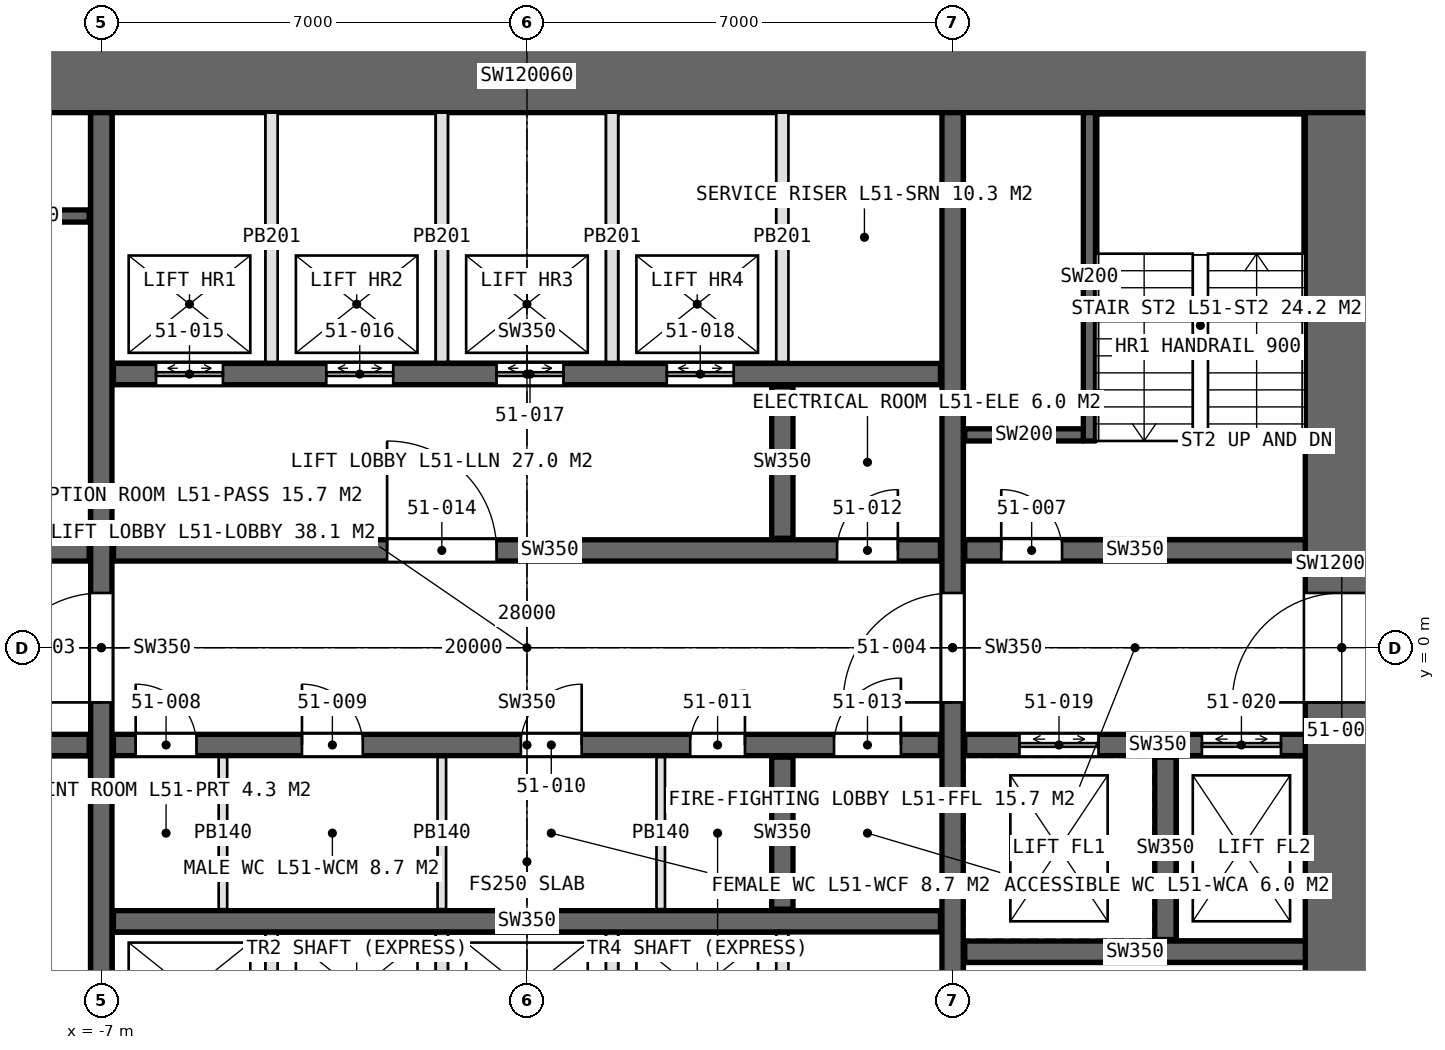
"""IFC4 building model, lengths in metres.
Left out: names, types, materials, properties, quantities, classifications, styles, units other than length and angle.
Written with IfcOpenShell. Run it as: python <this file> out.ifc"""

import sys

from ifc_helpers import new_model, si_unit, direction, frame, frame_2d, origin, place, context, subcontext, project, spatial, rectangle, extrude, element, fill, save


model = new_model("IFC4")
c1 = context("Model", 3, precision=1e-05, world=origin(), true_north=direction((0.0, 1.0)))
c2 = subcontext(c1, "Body", "Model", "MODEL_VIEW")
j1 = project(units=[si_unit("LENGTHUNIT", "METRE"), si_unit("PLANEANGLEUNIT", "RADIAN")], contexts=[c1])
p1 = place(None, origin())
s1 = spatial("IfcSite", under=j1, at=p1, CompositionType="ELEMENT")
p2 = place(p1, origin())
s2 = spatial("IfcBuilding", under=s1, at=p2, CompositionType="ELEMENT")
p3 = place(p2, frame((0.0, 0.0, 232.6)))
s3 = spatial("IfcBuildingStorey", under=s2, at=p3, CompositionType="ELEMENT", Elevation=232.6)
p4 = place(p3, frame((14.0, 9.4, 0.0), z_axis=(0.0, 0.0, 1.0), x_axis=(-1.0, 0.0, 0.0)))
e1 = element("IfcWall", 1, at=p4, inside=s3, PredefinedType="SHEAR", context=c2, shape_type="SweptSolid", body=[
    extrude(rectangle(XDim=28.0, YDim=1.2, at=frame_2d((14.0, 0.0))), origin(), (0.0, 0.0, 1.0), 4.2),
])
p5 = place(p4, frame((24.0, 0.0, 0.0)))
e2 = element("IfcOpeningElement", 2, at=p5, cuts=e1, PredefinedType="OPENING", context=c2, shape_type="SweptSolid", body=[
    extrude(rectangle(XDim=1.0, YDim=2.4, at=frame_2d((0.5, 1.2))), frame((0.0, 0.61, 0.0), z_axis=(0.0, -1.0, 0.0), x_axis=(1.0, 0.0, 0.0)), (0.0, 0.0, 1.0), 1.22),
])
p6 = place(p3, frame((13.4, -8.8, 0.0), z_axis=(0.0, 0.0, 1.0), x_axis=(0.0, 1.0, 0.0)))
e3 = element("IfcWall", 3, at=p6, inside=s3, PredefinedType="SHEAR", context=c2, shape_type="SweptSolid", body=[
    extrude(rectangle(XDim=17.6, YDim=1.2, at=frame_2d((8.8, 0.0))), origin(), (0.0, 0.0, 1.0), 4.2),
])
p7 = place(p6, frame((7.9, 0.0, 0.0)))
e4 = element("IfcOpeningElement", 4, at=p7, cuts=e3, PredefinedType="OPENING", context=c2, shape_type="SweptSolid", body=[
    extrude(rectangle(XDim=1.8, YDim=2.4, at=frame_2d((0.9, 1.2))), frame((0.0, 0.61, 0.0), z_axis=(0.0, -1.0, 0.0), x_axis=(1.0, 0.0, 0.0)), (0.0, 0.0, 1.0), 1.22),
])
p8 = place(p3, frame((-7.0, -8.8, 0.0), z_axis=(0.0, 0.0, 1.0), x_axis=(0.0, 1.0, 0.0)))
e5 = element("IfcWall", 5, at=p8, inside=s3, PredefinedType="SHEAR", context=c2, shape_type="SweptSolid", body=[
    extrude(rectangle(XDim=17.6, YDim=0.35, at=frame_2d((8.8, 0.0))), origin(), (0.0, 0.0, 1.0), 4.2),
])
p9 = place(p8, frame((7.9, 0.0, 0.0)))
e6 = element("IfcOpeningElement", 6, at=p9, cuts=e5, PredefinedType="OPENING", context=c2, shape_type="SweptSolid", body=[
    extrude(rectangle(XDim=1.8, YDim=2.4, at=frame_2d((0.9, 1.2))), frame((0.0, 0.185, 0.0), z_axis=(0.0, -1.0, 0.0), x_axis=(1.0, 0.0, 0.0)), (0.0, 0.0, 1.0), 0.37),
])
p10 = place(p3, frame((7.0, -8.8, 0.0), z_axis=(0.0, 0.0, 1.0), x_axis=(0.0, 1.0, 0.0)))
e7 = element("IfcWall", 7, at=p10, inside=s3, PredefinedType="SHEAR", context=c2, shape_type="SweptSolid", body=[
    extrude(rectangle(XDim=17.6, YDim=0.35, at=frame_2d((8.8, 0.0))), origin(), (0.0, 0.0, 1.0), 4.2),
])
p11 = place(p10, frame((7.9, 0.0, 0.0)))
e8 = element("IfcOpeningElement", 8, at=p11, cuts=e7, PredefinedType="OPENING", context=c2, shape_type="SweptSolid", body=[
    extrude(rectangle(XDim=1.8, YDim=2.4, at=frame_2d((0.9, 1.2))), frame((0.0, 0.185, 0.0), z_axis=(0.0, -1.0, 0.0), x_axis=(1.0, 0.0, 0.0)), (0.0, 0.0, 1.0), 0.37),
])
p12 = place(p3, frame((-6.8, 1.6, 0.0), z_axis=(0.0, 0.0, 1.0), x_axis=(1.0, 0.0, 0.0)))
e9 = element("IfcWall", 9, at=p12, inside=s3, PredefinedType="SHEAR", context=c2, shape_type="SweptSolid", body=[
    extrude(rectangle(XDim=13.6, YDim=0.35, at=frame_2d((6.8, 0.0))), origin(), (0.0, 0.0, 1.0), 4.2),
])
p13 = place(p12, frame((11.9, 0.0, 0.0)))
e10 = element("IfcOpeningElement", 10, at=p13, cuts=e9, PredefinedType="OPENING", context=c2, shape_type="SweptSolid", body=[
    extrude(rectangle(XDim=1.0, YDim=2.4, at=frame_2d((0.5, 1.2))), frame((0.0, 0.185, 0.0), z_axis=(0.0, -1.0, 0.0), x_axis=(1.0, 0.0, 0.0)), (0.0, 0.0, 1.0), 0.37),
])
p14 = place(p12, frame((4.5, 0.0, 0.0)))
e11 = element("IfcOpeningElement", 11, at=p14, cuts=e9, PredefinedType="OPENING", context=c2, shape_type="SweptSolid", body=[
    extrude(rectangle(XDim=1.8, YDim=2.4, at=frame_2d((0.9, 1.2))), frame((0.0, 0.185, 0.0), z_axis=(0.0, -1.0, 0.0), x_axis=(1.0, 0.0, 0.0)), (0.0, 0.0, 1.0), 0.37),
])
p15 = place(p3, frame((-6.8, -1.6, 0.0), z_axis=(0.0, 0.0, 1.0), x_axis=(1.0, 0.0, 0.0)))
e12 = element("IfcWall", 12, at=p15, inside=s3, PredefinedType="SHEAR", context=c2, shape_type="SweptSolid", body=[
    extrude(rectangle(XDim=13.6, YDim=0.35, at=frame_2d((6.8, 0.0))), origin(), (0.0, 0.0, 1.0), 4.2),
])
p16 = place(p15, frame((0.365, 0.0, 0.0)))
e13 = element("IfcOpeningElement", 13, at=p16, cuts=e12, PredefinedType="OPENING", context=c2, shape_type="SweptSolid", body=[
    extrude(rectangle(XDim=1.0, YDim=2.4, at=frame_2d((0.5, 1.2))), frame((0.0, 0.185, 0.0), z_axis=(0.0, -1.0, 0.0), x_axis=(1.0, 0.0, 0.0)), (0.0, 0.0, 1.0), 0.37),
])
p17 = place(p15, frame((3.1, 0.0, 0.0)))
e14 = element("IfcOpeningElement", 14, at=p17, cuts=e12, PredefinedType="OPENING", context=c2, shape_type="SweptSolid", body=[
    extrude(rectangle(XDim=1.0, YDim=2.4, at=frame_2d((0.5, 1.2))), frame((0.0, 0.185, 0.0), z_axis=(0.0, -1.0, 0.0), x_axis=(1.0, 0.0, 0.0)), (0.0, 0.0, 1.0), 0.37),
])
p18 = place(p15, frame((6.7, 0.0, 0.0)))
e15 = element("IfcOpeningElement", 15, at=p18, cuts=e12, PredefinedType="OPENING", context=c2, shape_type="SweptSolid", body=[
    extrude(rectangle(XDim=1.0, YDim=2.4, at=frame_2d((0.5, 1.2))), frame((0.0, 0.185, 0.0), z_axis=(0.0, -1.0, 0.0), x_axis=(1.0, 0.0, 0.0)), (0.0, 0.0, 1.0), 0.37),
])
p19 = place(p15, frame((9.485, 0.0, 0.0)))
e16 = element("IfcOpeningElement", 16, at=p19, cuts=e12, PredefinedType="OPENING", context=c2, shape_type="SweptSolid", body=[
    extrude(rectangle(XDim=0.9, YDim=2.4, at=frame_2d((0.45, 1.2))), frame((0.0, 0.185, 0.0), z_axis=(0.0, -1.0, 0.0), x_axis=(1.0, 0.0, 0.0)), (0.0, 0.0, 1.0), 0.37),
])
p20 = place(p15, frame((11.85, 0.0, 0.0)))
e17 = element("IfcOpeningElement", 17, at=p20, cuts=e12, PredefinedType="OPENING", context=c2, shape_type="SweptSolid", body=[
    extrude(rectangle(XDim=1.1, YDim=2.4, at=frame_2d((0.55, 1.2))), frame((0.0, 0.185, 0.0), z_axis=(0.0, -1.0, 0.0), x_axis=(1.0, 0.0, 0.0)), (0.0, 0.0, 1.0), 0.37),
])
p21 = place(p3, frame((-6.8, 4.5, 0.0), z_axis=(0.0, 0.0, 1.0), x_axis=(1.0, 0.0, 0.0)))
e18 = element("IfcWall", 18, at=p21, inside=s3, PredefinedType="SHEAR", context=c2, shape_type="SweptSolid", body=[
    extrude(rectangle(XDim=13.6, YDim=0.35, at=frame_2d((6.8, 0.0))), origin(), (0.0, 0.0, 1.0), 4.2),
])
p22 = place(p21, frame((0.7, 0.0, 0.0)))
e19 = element("IfcOpeningElement", 19, at=p22, cuts=e18, PredefinedType="OPENING", context=c2, shape_type="SweptSolid", body=[
    extrude(rectangle(XDim=1.1, YDim=2.4, at=frame_2d((0.55, 1.2))), frame((0.0, 0.185, 0.0), z_axis=(0.0, -1.0, 0.0), x_axis=(1.0, 0.0, 0.0)), (0.0, 0.0, 1.0), 0.37),
])
p23 = place(p21, frame((3.5, 0.0, 0.0)))
e20 = element("IfcOpeningElement", 20, at=p23, cuts=e18, PredefinedType="OPENING", context=c2, shape_type="SweptSolid", body=[
    extrude(rectangle(XDim=1.1, YDim=2.4, at=frame_2d((0.55, 1.2))), frame((0.0, 0.185, 0.0), z_axis=(0.0, -1.0, 0.0), x_axis=(1.0, 0.0, 0.0)), (0.0, 0.0, 1.0), 0.37),
])
p24 = place(p21, frame((6.3, 0.0, 0.0)))
e21 = element("IfcOpeningElement", 21, at=p24, cuts=e18, PredefinedType="OPENING", context=c2, shape_type="SweptSolid", body=[
    extrude(rectangle(XDim=1.1, YDim=2.4, at=frame_2d((0.55, 1.2))), frame((0.0, 0.185, 0.0), z_axis=(0.0, -1.0, 0.0), x_axis=(1.0, 0.0, 0.0)), (0.0, 0.0, 1.0), 0.37),
])
p25 = place(p21, frame((9.1, 0.0, 0.0)))
e22 = element("IfcOpeningElement", 22, at=p25, cuts=e18, PredefinedType="OPENING", context=c2, shape_type="SweptSolid", body=[
    extrude(rectangle(XDim=1.1, YDim=2.4, at=frame_2d((0.55, 1.2))), frame((0.0, 0.185, 0.0), z_axis=(0.0, -1.0, 0.0), x_axis=(1.0, 0.0, 0.0)), (0.0, 0.0, 1.0), 0.37),
])
p26 = place(p3, frame((-6.8, -4.5, 0.0), z_axis=(0.0, 0.0, 1.0), x_axis=(1.0, 0.0, 0.0)))
e23 = element("IfcWall", 23, at=p26, inside=s3, PredefinedType="SHEAR", context=c2, shape_type="SweptSolid", body=[
    extrude(rectangle(XDim=13.6, YDim=0.35, at=frame_2d((6.8, 0.0))), origin(), (0.0, 0.0, 1.0), 4.2),
])
for number, where, z_axis, x_axis in (
    (24, (-12.8, 1.6, 0.0), (0.0, 0.0, 1.0), (1.0, 0.0, 0.0)),
    (25, (-12.8, -1.6, 0.0), (0.0, 0.0, 1.0), (1.0, 0.0, 0.0)),
):
    element("IfcWall", number, at=place(p3, frame(where, z_axis=z_axis, x_axis=x_axis)), inside=s3, PredefinedType="SHEAR", context=c2, shape_type="SweptSolid", body=[
        extrude(rectangle(XDim=5.6, YDim=0.35, at=frame_2d((2.8, 0.0))), origin(), (0.0, 0.0, 1.0), 4.2),
    ])
p27 = place(p3, frame((7.2, 1.6, 0.0), z_axis=(0.0, 0.0, 1.0), x_axis=(1.0, 0.0, 0.0)))
e26 = element("IfcWall", 26, at=p27, inside=s3, PredefinedType="SHEAR", context=c2, shape_type="SweptSolid", body=[
    extrude(rectangle(XDim=5.6, YDim=0.35, at=frame_2d((2.8, 0.0))), origin(), (0.0, 0.0, 1.0), 4.2),
])
p28 = place(p27, frame((0.6, 0.0, 0.0)))
e27 = element("IfcOpeningElement", 27, at=p28, cuts=e26, PredefinedType="OPENING", context=c2, shape_type="SweptSolid", body=[
    extrude(rectangle(XDim=1.0, YDim=2.4, at=frame_2d((0.5, 1.2))), frame((0.0, 0.185, 0.0), z_axis=(0.0, -1.0, 0.0), x_axis=(1.0, 0.0, 0.0)), (0.0, 0.0, 1.0), 0.37),
])
p29 = place(p3, frame((7.2, -1.6, 0.0), z_axis=(0.0, 0.0, 1.0), x_axis=(1.0, 0.0, 0.0)))
e28 = element("IfcWall", 28, at=p29, inside=s3, PredefinedType="SHEAR", context=c2, shape_type="SweptSolid", body=[
    extrude(rectangle(XDim=5.6, YDim=0.35, at=frame_2d((2.8, 0.0))), origin(), (0.0, 0.0, 1.0), 4.2),
])
p30 = place(p29, frame((0.9, 0.0, 0.0)))
e29 = element("IfcOpeningElement", 29, at=p30, cuts=e28, PredefinedType="OPENING", context=c2, shape_type="SweptSolid", body=[
    extrude(rectangle(XDim=1.3, YDim=2.4, at=frame_2d((0.65, 1.2))), frame((0.0, 0.185, 0.0), z_axis=(0.0, -1.0, 0.0), x_axis=(1.0, 0.0, 0.0)), (0.0, 0.0, 1.0), 0.37),
])
p31 = place(p29, frame((3.9, 0.0, 0.0)))
e30 = element("IfcOpeningElement", 30, at=p31, cuts=e28, PredefinedType="OPENING", context=c2, shape_type="SweptSolid", body=[
    extrude(rectangle(XDim=1.3, YDim=2.4, at=frame_2d((0.65, 1.2))), frame((0.0, 0.185, 0.0), z_axis=(0.0, -1.0, 0.0), x_axis=(1.0, 0.0, 0.0)), (0.0, 0.0, 1.0), 0.37),
])
p32 = place(p3, frame((10.5, -4.8, 0.0), z_axis=(0.0, 0.0, 1.0), x_axis=(0.0, 1.0, 0.0)))
e31 = element("IfcWall", 31, at=p32, inside=s3, PredefinedType="SHEAR", context=c2, shape_type="SweptSolid", body=[
    extrude(rectangle(XDim=3.0, YDim=0.35, at=frame_2d((1.5, 0.0))), origin(), (0.0, 0.0, 1.0), 4.2),
])
p33 = place(p3, frame((7.2, -5.0, 0.0), z_axis=(0.0, 0.0, 1.0), x_axis=(1.0, 0.0, 0.0)))
e32 = element("IfcWall", 32, at=p33, inside=s3, PredefinedType="SHEAR", context=c2, shape_type="SweptSolid", body=[
    extrude(rectangle(XDim=5.6, YDim=0.35, at=frame_2d((2.8, 0.0))), origin(), (0.0, 0.0, 1.0), 4.2),
])
for number, where, z_axis, x_axis in (
    (33, (4.2, 1.8, 0.0), (0.0, 0.0, 1.0), (0.0, 1.0, 0.0)),
    (34, (4.2, -4.3, 0.0), (0.0, 0.0, 1.0), (0.0, 1.0, 0.0)),
):
    element("IfcWall", number, at=place(p3, frame(where, z_axis=z_axis, x_axis=x_axis)), inside=s3, PredefinedType="SHEAR", context=c2, shape_type="SweptSolid", body=[
        extrude(rectangle(XDim=2.5, YDim=0.35, at=frame_2d((1.25, 0.0))), origin(), (0.0, 0.0, 1.0), 4.2),
    ])
for number, where, z_axis, x_axis in (
    (35, (-5.0, -1.8, 0.0), (0.0, 0.0, 1.0), (0.0, -1.0, 0.0)),
    (36, (-1.4, -1.8, 0.0), (0.0, 0.0, 1.0), (0.0, -1.0, 0.0)),
    (37, (2.2, -1.8, 0.0), (0.0, 0.0, 1.0), (0.0, -1.0, 0.0)),
):
    element("IfcWall", number, at=place(p3, frame(where, z_axis=z_axis, x_axis=x_axis)), inside=s3, PredefinedType="PARTITIONING", context=c2, shape_type="SweptSolid", body=[
        extrude(rectangle(XDim=2.5, YDim=0.14, at=frame_2d((1.25, 0.0))), origin(), (0.0, 0.0, 1.0), 3.95),
    ])
for number, where, z_axis, x_axis in (
    (38, (-4.2, 4.7, 0.0), (0.0, 0.0, 1.0), (0.0, 1.0, 0.0)),
    (39, (-1.4, 4.7, 0.0), (0.0, 0.0, 1.0), (0.0, 1.0, 0.0)),
    (40, (1.4, 4.7, 0.0), (0.0, 0.0, 1.0), (0.0, 1.0, 0.0)),
    (41, (4.2, 4.7, 0.0), (0.0, 0.0, 1.0), (0.0, 1.0, 0.0)),
    (42, (-4.2, -4.7, 0.0), (0.0, 0.0, 1.0), (0.0, -1.0, 0.0)),
    (43, (-1.4, -4.7, 0.0), (0.0, 0.0, 1.0), (0.0, -1.0, 0.0)),
    (44, (1.4, -4.7, 0.0), (0.0, 0.0, 1.0), (0.0, -1.0, 0.0)),
    (45, (4.2, -4.7, 0.0), (0.0, 0.0, 1.0), (0.0, -1.0, 0.0)),
):
    element("IfcWall", number, at=place(p3, frame(where, z_axis=z_axis, x_axis=x_axis)), inside=s3, PredefinedType="PARTITIONING", context=c2, shape_type="SweptSolid", body=[
        extrude(rectangle(XDim=4.1, YDim=0.2, at=frame_2d((2.05, 0.0))), origin(), (0.0, 0.0, 1.0), 4.2),
    ])
p34 = place(p3, frame((-9.15, 7.1, 0.0), z_axis=(0.0, 0.0, 1.0), x_axis=(1.0, 0.0, 0.0)))
e46 = element("IfcWall", 46, at=p34, inside=s3, PredefinedType="SOLIDWALL", context=c2, shape_type="SweptSolid", body=[
    extrude(rectangle(XDim=1.95, YDim=0.2, at=frame_2d((0.975, 0.0))), origin(), (0.0, 0.0, 1.0), 4.2),
])
p35 = place(p3, frame((9.25, 3.4, 0.0), z_axis=(0.0, 0.0, 1.0), x_axis=(0.0, 1.0, 0.0)))
e47 = element("IfcWall", 47, at=p35, inside=s3, PredefinedType="SOLIDWALL", context=c2, shape_type="SweptSolid", body=[
    extrude(rectangle(XDim=5.4, YDim=0.2, at=frame_2d((2.7, 0.0))), origin(), (0.0, 0.0, 1.0), 4.2),
])
p36 = place(p3, frame((9.15, 3.5, 0.0), z_axis=(0.0, 0.0, 1.0), x_axis=(-1.0, 0.0, 0.0)))
e48 = element("IfcWall", 48, at=p36, inside=s3, PredefinedType="SOLIDWALL", context=c2, shape_type="SweptSolid", body=[
    extrude(rectangle(XDim=1.95, YDim=0.2, at=frame_2d((0.975, 0.0))), origin(), (0.0, 0.0, 1.0), 4.2),
])
p37 = place(p7, origin())
e49 = element("IfcDoor", 49, at=p37, inside=s3, OperationType="DOUBLE_DOOR_SINGLE_SWING", PredefinedType="DOOR", context=c2, shape_type="SweptSolid", body=[
    extrude(rectangle(XDim=1.8, YDim=2.4, at=frame_2d((0.9, 1.2))), frame((0.0, 0.025, 0.0), z_axis=(0.0, -1.0, 0.0), x_axis=(1.0, 0.0, 0.0)), (0.0, 0.0, 1.0), 0.05),
])
fill(e4, e49)
p38 = place(p9, origin())
e50 = element("IfcDoor", 50, at=p38, inside=s3, OperationType="DOUBLE_DOOR_SINGLE_SWING", PredefinedType="DOOR", context=c2, shape_type="SweptSolid", body=[
    extrude(rectangle(XDim=1.8, YDim=2.4, at=frame_2d((0.9, 1.2))), frame((0.0, 0.025, 0.0), z_axis=(0.0, -1.0, 0.0), x_axis=(1.0, 0.0, 0.0)), (0.0, 0.0, 1.0), 0.05),
])
fill(e6, e50)
p39 = place(p11, origin())
e51 = element("IfcDoor", 51, at=p39, inside=s3, OperationType="DOUBLE_DOOR_SINGLE_SWING", PredefinedType="DOOR", context=c2, shape_type="SweptSolid", body=[
    extrude(rectangle(XDim=1.8, YDim=2.4, at=frame_2d((0.9, 1.2))), frame((0.0, 0.025, 0.0), z_axis=(0.0, -1.0, 0.0), x_axis=(1.0, 0.0, 0.0)), (0.0, 0.0, 1.0), 0.05),
])
fill(e8, e51)
p40 = place(p28, origin())
e52 = element("IfcDoor", 52, at=p40, inside=s3, OperationType="SINGLE_SWING_LEFT", PredefinedType="DOOR", context=c2, shape_type="SweptSolid", body=[
    extrude(rectangle(XDim=1.0, YDim=2.4, at=frame_2d((0.5, 1.2))), frame((0.0, 0.025, 0.0), z_axis=(0.0, -1.0, 0.0), x_axis=(1.0, 0.0, 0.0)), (0.0, 0.0, 1.0), 0.05),
])
fill(e27, e52)
p41 = place(p16, origin())
e53 = element("IfcDoor", 53, at=p41, inside=s3, OperationType="SINGLE_SWING_LEFT", PredefinedType="DOOR", context=c2, shape_type="SweptSolid", body=[
    extrude(rectangle(XDim=1.0, YDim=2.4, at=frame_2d((0.5, 1.2))), frame((0.0, 0.025, 0.0), z_axis=(0.0, -1.0, 0.0), x_axis=(1.0, 0.0, 0.0)), (0.0, 0.0, 1.0), 0.05),
])
fill(e13, e53)
p42 = place(p17, origin())
e54 = element("IfcDoor", 54, at=p42, inside=s3, OperationType="SINGLE_SWING_LEFT", PredefinedType="DOOR", context=c2, shape_type="SweptSolid", body=[
    extrude(rectangle(XDim=1.0, YDim=2.4, at=frame_2d((0.5, 1.2))), frame((0.0, 0.025, 0.0), z_axis=(0.0, -1.0, 0.0), x_axis=(1.0, 0.0, 0.0)), (0.0, 0.0, 1.0), 0.05),
])
fill(e14, e54)
p43 = place(p18, origin())
e55 = element("IfcDoor", 55, at=p43, inside=s3, OperationType="SINGLE_SWING_RIGHT", PredefinedType="DOOR", context=c2, shape_type="SweptSolid", body=[
    extrude(rectangle(XDim=1.0, YDim=2.4, at=frame_2d((0.5, 1.2))), frame((0.0, 0.025, 0.0), z_axis=(0.0, -1.0, 0.0), x_axis=(1.0, 0.0, 0.0)), (0.0, 0.0, 1.0), 0.05),
])
fill(e15, e55)
p44 = place(p19, origin())
e56 = element("IfcDoor", 56, at=p44, inside=s3, OperationType="SINGLE_SWING_RIGHT", PredefinedType="DOOR", context=c2, shape_type="SweptSolid", body=[
    extrude(rectangle(XDim=0.9, YDim=2.4, at=frame_2d((0.45, 1.2))), frame((0.0, 0.025, 0.0), z_axis=(0.0, -1.0, 0.0), x_axis=(1.0, 0.0, 0.0)), (0.0, 0.0, 1.0), 0.05),
])
fill(e16, e56)
p45 = place(p13, origin())
e57 = element("IfcDoor", 57, at=p45, inside=s3, OperationType="SINGLE_SWING_RIGHT", PredefinedType="DOOR", context=c2, shape_type="SweptSolid", body=[
    extrude(rectangle(XDim=1.0, YDim=2.4, at=frame_2d((0.5, 1.2))), frame((0.0, 0.025, 0.0), z_axis=(0.0, -1.0, 0.0), x_axis=(1.0, 0.0, 0.0)), (0.0, 0.0, 1.0), 0.05),
])
fill(e10, e57)
p46 = place(p20, origin())
e58 = element("IfcDoor", 58, at=p46, inside=s3, OperationType="SINGLE_SWING_RIGHT", PredefinedType="DOOR", context=c2, shape_type="SweptSolid", body=[
    extrude(rectangle(XDim=1.1, YDim=2.4, at=frame_2d((0.55, 1.2))), frame((0.0, 0.025, 0.0), z_axis=(0.0, -1.0, 0.0), x_axis=(1.0, 0.0, 0.0)), (0.0, 0.0, 1.0), 0.05),
])
fill(e17, e58)
p47 = place(p14, origin())
e59 = element("IfcDoor", 59, at=p47, inside=s3, OperationType="DOUBLE_DOOR_SINGLE_SWING", PredefinedType="DOOR", context=c2, shape_type="SweptSolid", body=[
    extrude(rectangle(XDim=1.8, YDim=2.4, at=frame_2d((0.9, 1.2))), frame((0.0, 0.025, 0.0), z_axis=(0.0, -1.0, 0.0), x_axis=(1.0, 0.0, 0.0)), (0.0, 0.0, 1.0), 0.05),
])
fill(e11, e59)
p48 = place(p22, origin())
e60 = element("IfcDoor", 60, at=p48, inside=s3, OperationType="DOUBLE_DOOR_SLIDING", PredefinedType="DOOR", context=c2, shape_type="SweptSolid", body=[
    extrude(rectangle(XDim=1.1, YDim=2.4, at=frame_2d((0.55, 1.2))), frame((0.0, 0.025, 0.0), z_axis=(0.0, -1.0, 0.0), x_axis=(1.0, 0.0, 0.0)), (0.0, 0.0, 1.0), 0.05),
])
fill(e19, e60)
p49 = place(p23, origin())
e61 = element("IfcDoor", 61, at=p49, inside=s3, OperationType="DOUBLE_DOOR_SLIDING", PredefinedType="DOOR", context=c2, shape_type="SweptSolid", body=[
    extrude(rectangle(XDim=1.1, YDim=2.4, at=frame_2d((0.55, 1.2))), frame((0.0, 0.025, 0.0), z_axis=(0.0, -1.0, 0.0), x_axis=(1.0, 0.0, 0.0)), (0.0, 0.0, 1.0), 0.05),
])
fill(e20, e61)
p50 = place(p24, origin())
e62 = element("IfcDoor", 62, at=p50, inside=s3, OperationType="DOUBLE_DOOR_SLIDING", PredefinedType="DOOR", context=c2, shape_type="SweptSolid", body=[
    extrude(rectangle(XDim=1.1, YDim=2.4, at=frame_2d((0.55, 1.2))), frame((0.0, 0.025, 0.0), z_axis=(0.0, -1.0, 0.0), x_axis=(1.0, 0.0, 0.0)), (0.0, 0.0, 1.0), 0.05),
])
fill(e21, e62)
p51 = place(p25, origin())
e63 = element("IfcDoor", 63, at=p51, inside=s3, OperationType="DOUBLE_DOOR_SLIDING", PredefinedType="DOOR", context=c2, shape_type="SweptSolid", body=[
    extrude(rectangle(XDim=1.1, YDim=2.4, at=frame_2d((0.55, 1.2))), frame((0.0, 0.025, 0.0), z_axis=(0.0, -1.0, 0.0), x_axis=(1.0, 0.0, 0.0)), (0.0, 0.0, 1.0), 0.05),
])
fill(e22, e63)
p52 = place(p30, origin())
e64 = element("IfcDoor", 64, at=p52, inside=s3, OperationType="DOUBLE_DOOR_SLIDING", PredefinedType="DOOR", context=c2, shape_type="SweptSolid", body=[
    extrude(rectangle(XDim=1.3, YDim=2.4, at=frame_2d((0.65, 1.2))), frame((0.0, 0.025, 0.0), z_axis=(0.0, -1.0, 0.0), x_axis=(1.0, 0.0, 0.0)), (0.0, 0.0, 1.0), 0.05),
])
fill(e29, e64)
p53 = place(p31, origin())
e65 = element("IfcDoor", 65, at=p53, inside=s3, OperationType="DOUBLE_DOOR_SLIDING", PredefinedType="DOOR", context=c2, shape_type="SweptSolid", body=[
    extrude(rectangle(XDim=1.3, YDim=2.4, at=frame_2d((0.65, 1.2))), frame((0.0, 0.025, 0.0), z_axis=(0.0, -1.0, 0.0), x_axis=(1.0, 0.0, 0.0)), (0.0, 0.0, 1.0), 0.05),
])
fill(e30, e65)
save(model, sys.argv[1])
